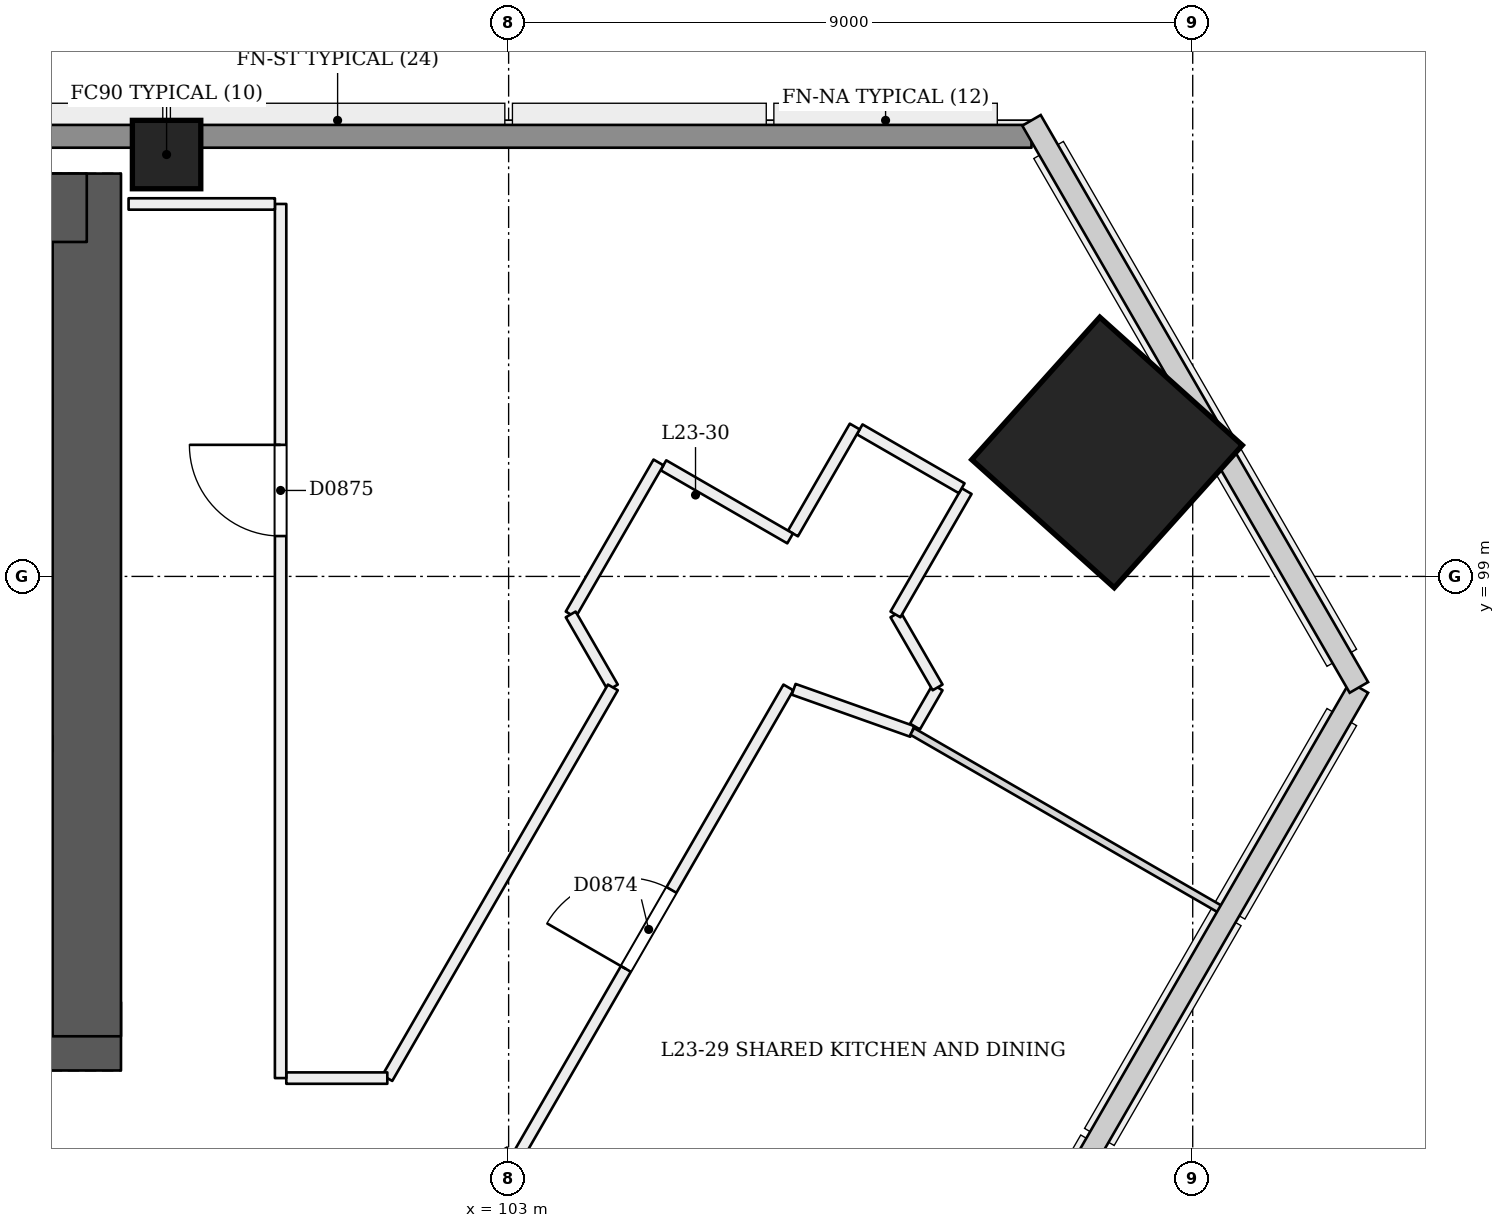
"""IFC4 building model, lengths in metres.
Left out: names, types, materials, properties, quantities, classifications, styles, units other than length and angle.
Written with IfcOpenShell. Run it as: python <this file> out.ifc"""

import sys

from ifc_helpers import new_model, si_unit, direction, frame, frame_2d, origin, origin_2d, place, context, subcontext, project, spatial, rectangle, extrude, element, fill, save


model = new_model("IFC4")
c1 = context("Model", 3, precision=1e-05, world=origin(), true_north=direction((0.0, 1.0)))
c2 = subcontext(c1, "Body", "Model", "MODEL_VIEW")
j1 = project(units=[si_unit("LENGTHUNIT", "METRE"), si_unit("PLANEANGLEUNIT", "RADIAN")], contexts=[c1])
p1 = place(None, origin())
s1 = spatial("IfcSite", under=j1, at=p1, CompositionType="ELEMENT")
p2 = place(p1, origin())
s2 = spatial("IfcBuilding", under=s1, at=p2, CompositionType="ELEMENT")
p3 = place(p2, frame((0.0, 0.0, 91.8)))
s3 = spatial("IfcBuildingStorey", under=s2, at=p3, CompositionType="ELEMENT", Elevation=91.8)
p4 = place(p3, frame((72.55, 92.95, 0.0), z_axis=(0.0, 0.0, 1.0), x_axis=(1.0, 0.0, 0.0)))
e1 = element("IfcWall", 1, at=p4, inside=s3, PredefinedType="SHEAR", context=c2, shape_type="SweptSolid", body=[
    extrude(rectangle(XDim=25.35, YDim=0.9, at=frame_2d((12.675, 0.0))), origin(), (0.0, 0.0, 1.0), 3.6),
])
p5 = place(p4, frame((1.25, 0.0, 0.0)))
e2 = element("IfcOpeningElement", 2, at=p5, cuts=e1, PredefinedType="OPENING", context=c2, shape_type="SweptSolid", body=[
    extrude(rectangle(XDim=1.2, YDim=2.1, at=frame_2d((0.6, 1.05))), frame((0.0, 0.46, 0.0), z_axis=(0.0, -1.0, 0.0), x_axis=(1.0, 0.0, 0.0)), (0.0, 0.0, 1.0), 0.921),
])
p6 = place(p4, frame((3.45, 0.0, 0.0)))
e3 = element("IfcOpeningElement", 3, at=p6, cuts=e1, PredefinedType="OPENING", context=c2, shape_type="SweptSolid", body=[
    extrude(rectangle(XDim=1.2, YDim=2.1, at=frame_2d((0.6, 1.05))), frame((0.0, 0.46, 0.0), z_axis=(0.0, -1.0, 0.0), x_axis=(1.0, 0.0, 0.0)), (0.0, 0.0, 1.0), 0.921),
])
p7 = place(p4, frame((13.45, 0.0, 0.0)))
e4 = element("IfcOpeningElement", 4, at=p7, cuts=e1, PredefinedType="OPENING", context=c2, shape_type="SweptSolid", body=[
    extrude(rectangle(XDim=1.2, YDim=2.1, at=frame_2d((0.6, 1.05))), frame((0.0, 0.46, 0.0), z_axis=(0.0, -1.0, 0.0), x_axis=(1.0, 0.0, 0.0)), (0.0, 0.0, 1.0), 0.921),
])
p8 = place(p4, frame((15.712, 0.0, 0.0)))
e5 = element("IfcOpeningElement", 5, at=p8, cuts=e1, PredefinedType="OPENING", context=c2, shape_type="SweptSolid", body=[
    extrude(rectangle(XDim=1.0, YDim=2.1, at=frame_2d((0.5, 1.05))), frame((0.0, 0.46, 0.0), z_axis=(0.0, -1.0, 0.0), x_axis=(1.0, 0.0, 0.0)), (0.0, 0.0, 1.0), 0.921),
])
p9 = place(p4, frame((18.35, 0.0, 0.0)))
e6 = element("IfcOpeningElement", 6, at=p9, cuts=e1, PredefinedType="OPENING", context=c2, shape_type="SweptSolid", body=[
    extrude(rectangle(XDim=1.0, YDim=2.1, at=frame_2d((0.5, 1.05))), frame((0.0, 0.46, 0.0), z_axis=(0.0, -1.0, 0.0), x_axis=(1.0, 0.0, 0.0)), (0.0, 0.0, 1.0), 0.921),
])
p10 = place(p4, frame((21.938, 0.0, 0.0)))
e7 = element("IfcOpeningElement", 7, at=p10, cuts=e1, PredefinedType="OPENING", context=c2, shape_type="SweptSolid", body=[
    extrude(rectangle(XDim=1.0, YDim=2.1, at=frame_2d((0.5, 1.05))), frame((0.0, 0.46, 0.0), z_axis=(0.0, -1.0, 0.0), x_axis=(1.0, 0.0, 0.0)), (0.0, 0.0, 1.0), 0.921),
])
p11 = place(p3, frame((97.45, 92.95, 0.0), z_axis=(0.0, 0.0, 1.0), x_axis=(0.0, 1.0, 0.0)))
e8 = element("IfcWall", 8, at=p11, inside=s3, PredefinedType="SHEAR", context=c2, shape_type="SweptSolid", body=[
    extrude(rectangle(XDim=11.35, YDim=0.9, at=frame_2d((5.675, 0.0))), origin(), (0.0, 0.0, 1.0), 3.6),
])
p12 = place(p3, frame((97.45, 103.85, 0.0), z_axis=(0.0, 0.0, 1.0), x_axis=(-1.0, 0.0, 0.0)))
e9 = element("IfcWall", 9, at=p12, inside=s3, PredefinedType="SHEAR", context=c2, shape_type="SweptSolid", body=[
    extrude(rectangle(XDim=25.35, YDim=0.9, at=frame_2d((12.675, 0.0))), origin(), (0.0, 0.0, 1.0), 3.6),
])
p13 = place(p3, frame((102.868, 90.934, -0.021), z_axis=(-0.022155133694, 0.038483534979, 0.999013597298), x_axis=(-0.501312238363, -0.864981546016, 0.02220280883)))
e10 = element("IfcColumn", 10, at=p13, inside=s3, PredefinedType="COLUMN", context=c2, shape_type="SweptSolid", body=[
    extrude(rectangle(XDim=0.7, YDim=0.7, at=origin_2d()), origin(), (0.0, 0.0, 1.0), 3.604),
])
p14 = place(p3, frame((110.907, 100.62, 0.0), z_axis=(-0.028403739082, 0.009219352065, 0.999554016126), x_axis=(0.500754951448, -0.865304085665, 0.022210761635)))
e11 = element("IfcColumn", 11, at=p14, inside=s3, PredefinedType="COLUMN", context=c2, shape_type="SweptSolid", body=[
    extrude(rectangle(XDim=2.52, YDim=2.52, at=origin_2d()), origin(), (0.0, 0.0, 1.0), 3.602),
])
p15 = place(p3, frame((98.5, 104.55, 0.0), z_axis=(0.0, 0.0, 1.0), x_axis=(1.0, 0.0, 0.0)))
e12 = element("IfcColumn", 12, at=p15, inside=s3, PredefinedType="COLUMN", context=c2, shape_type="SweptSolid", body=[
    extrude(rectangle(XDim=0.9, YDim=0.9, at=origin_2d()), origin(), (0.0, 0.0, 1.0), 3.6),
])
p16 = place(p3, frame((85.554, 60.948, 0.0), z_axis=(0.0, 0.0, 1.0), x_axis=(0.500001382442, 0.86602460563, 0.0)))
e13 = element("IfcWall", 13, at=p16, inside=s3, PredefinedType="PARTITIONING", context=c2, shape_type="SweptSolid", body=[
    extrude(rectangle(XDim=42.252, YDim=0.15, at=frame_2d((21.126, 0.0))), origin(), (0.0, 0.0, 1.0), 2.9),
])
p17 = place(p16, frame((0.285, 0.0, 0.0)))
e14 = element("IfcOpeningElement", 14, at=p17, cuts=e13, PredefinedType="OPENING", context=c2, shape_type="SweptSolid", body=[
    extrude(rectangle(XDim=1.2, YDim=2.1, at=frame_2d((0.6, 1.05))), frame((0.0, 0.085, 0.0), z_axis=(0.0, -1.0, 0.0), x_axis=(1.0, 0.0, 0.0)), (0.0, 0.0, 1.0), 0.171),
])
p18 = place(p16, frame((3.731, 0.0, 0.0)))
e15 = element("IfcOpeningElement", 15, at=p18, cuts=e13, PredefinedType="OPENING", context=c2, shape_type="SweptSolid", body=[
    extrude(rectangle(XDim=1.0, YDim=2.1, at=frame_2d((0.5, 1.05))), frame((0.0, 0.085, 0.0), z_axis=(0.0, -1.0, 0.0), x_axis=(1.0, 0.0, 0.0)), (0.0, 0.0, 1.0), 0.171),
])
p19 = place(p16, frame((11.526, 0.0, 0.0)))
e16 = element("IfcOpeningElement", 16, at=p19, cuts=e13, PredefinedType="OPENING", context=c2, shape_type="SweptSolid", body=[
    extrude(rectangle(XDim=1.2, YDim=2.1, at=frame_2d((0.6, 1.05))), frame((0.0, 0.085, 0.0), z_axis=(0.0, -1.0, 0.0), x_axis=(1.0, 0.0, 0.0)), (0.0, 0.0, 1.0), 0.171),
])
p20 = place(p16, frame((18.376, 0.0, 0.0)))
e17 = element("IfcOpeningElement", 17, at=p20, cuts=e13, PredefinedType="OPENING", context=c2, shape_type="SweptSolid", body=[
    extrude(rectangle(XDim=1.0, YDim=2.1, at=frame_2d((0.5, 1.05))), frame((0.0, 0.085, 0.0), z_axis=(0.0, -1.0, 0.0), x_axis=(1.0, 0.0, 0.0)), (0.0, 0.0, 1.0), 0.171),
])
p21 = place(p16, frame((21.731, 0.0, 0.0)))
e18 = element("IfcOpeningElement", 18, at=p21, cuts=e13, PredefinedType="OPENING", context=c2, shape_type="SweptSolid", body=[
    extrude(rectangle(XDim=1.0, YDim=2.1, at=frame_2d((0.5, 1.05))), frame((0.0, 0.085, 0.0), z_axis=(0.0, -1.0, 0.0), x_axis=(1.0, 0.0, 0.0)), (0.0, 0.0, 1.0), 0.171),
])
p22 = place(p16, frame((27.376, 0.0, 0.0)))
e19 = element("IfcOpeningElement", 19, at=p22, cuts=e13, PredefinedType="OPENING", context=c2, shape_type="SweptSolid", body=[
    extrude(rectangle(XDim=1.0, YDim=2.1, at=frame_2d((0.5, 1.05))), frame((0.0, 0.085, 0.0), z_axis=(0.0, -1.0, 0.0), x_axis=(1.0, 0.0, 0.0)), (0.0, 0.0, 1.0), 0.171),
])
p23 = place(p16, frame((30.697, 0.0, 0.0)))
e20 = element("IfcOpeningElement", 20, at=p23, cuts=e13, PredefinedType="OPENING", context=c2, shape_type="SweptSolid", body=[
    extrude(rectangle(XDim=1.1, YDim=2.1, at=frame_2d((0.55, 1.05))), frame((0.0, 0.085, 0.0), z_axis=(0.0, -1.0, 0.0), x_axis=(1.0, 0.0, 0.0)), (0.0, 0.0, 1.0), 0.171),
])
p24 = place(p16, frame((37.976, 0.0, 0.0)))
e21 = element("IfcOpeningElement", 21, at=p24, cuts=e13, PredefinedType="OPENING", context=c2, shape_type="SweptSolid", body=[
    extrude(rectangle(XDim=1.2, YDim=2.1, at=frame_2d((0.6, 1.05))), frame((0.0, 0.085, 0.0), z_axis=(0.0, -1.0, 0.0), x_axis=(1.0, 0.0, 0.0)), (0.0, 0.0, 1.0), 0.171),
])
p25 = place(p3, frame((106.75, 97.515, 0.0), z_axis=(0.0, 0.0, 1.0), x_axis=(0.942304690634, -0.334756433858, 0.0)))
e22 = element("IfcWall", 22, at=p25, inside=s3, PredefinedType="PARTITIONING", context=c2, shape_type="SweptSolid", body=[
    extrude(rectangle(XDim=1.655, YDim=0.15, at=frame_2d((0.827, 0.0))), origin(), (0.0, 0.0, 1.0), 3.3),
])
p26 = place(p3, frame((108.346, 97.025, 0.0), z_axis=(0.0, 0.0, 1.0), x_axis=(0.499983247966, 0.86603507536, 0.0)))
e23 = element("IfcWall", 23, at=p26, inside=s3, PredefinedType="PARTITIONING", context=c2, shape_type="SweptSolid", body=[
    extrude(rectangle(XDim=0.594, YDim=0.15, at=frame_2d((0.297, 0.0))), origin(), (0.0, 0.0, 1.0), 3.3),
])
p27 = place(p3, frame((108.644, 97.54, 0.0), z_axis=(0.0, 0.0, 1.0), x_axis=(-0.499951133605, 0.866053614973, 0.0)))
e24 = element("IfcWall", 24, at=p27, inside=s3, PredefinedType="PARTITIONING", context=c2, shape_type="SweptSolid", body=[
    extrude(rectangle(XDim=1.109, YDim=0.15, at=frame_2d((0.554, 0.0))), origin(), (0.0, 0.0, 1.0), 3.3),
])
p28 = place(p3, frame((108.089, 98.5, 0.0), z_axis=(0.0, 0.0, 1.0), x_axis=(0.499951854219, 0.86605319898, 0.0)))
e25 = element("IfcWall", 25, at=p28, inside=s3, PredefinedType="PARTITIONING", context=c2, shape_type="SweptSolid", body=[
    extrude(rectangle(XDim=1.873, YDim=0.15, at=frame_2d((0.937, 0.0))), origin(), (0.0, 0.0, 1.0), 3.3),
])
p29 = place(p3, frame((108.961, 100.16, 0.0), z_axis=(0.0, 0.0, 1.0), x_axis=(-0.865975732936, 0.500086022567, 0.0)))
e26 = element("IfcWall", 26, at=p29, inside=s3, PredefinedType="PARTITIONING", context=c2, shape_type="SweptSolid", body=[
    extrude(rectangle(XDim=1.55, YDim=0.15, at=frame_2d((0.775, 0.0))), origin(), (0.0, 0.0, 1.0), 3.3),
])
p30 = place(p3, frame((107.553, 100.972, 0.0), z_axis=(0.0, 0.0, 1.0), x_axis=(-0.500017246033, -0.866015446554, 0.0)))
e27 = element("IfcWall", 27, at=p30, inside=s3, PredefinedType="PARTITIONING", context=c2, shape_type="SweptSolid", body=[
    extrude(rectangle(XDim=1.625, YDim=0.15, at=frame_2d((0.812, 0.0))), origin(), (0.0, 0.0, 1.0), 3.3),
])
p31 = place(p3, frame((106.703, 99.5, 0.0), z_axis=(0.0, 0.0, 1.0), x_axis=(-0.866033512162, 0.499985955615, 0.0)))
e28 = element("IfcWall", 28, at=p31, inside=s3, PredefinedType="PARTITIONING", context=c2, shape_type="SweptSolid", body=[
    extrude(rectangle(XDim=1.925, YDim=0.15, at=frame_2d((0.962, 0.0))), origin(), (0.0, 0.0, 1.0), 3.3),
])
p32 = place(p3, frame((104.971, 100.5, 0.0), z_axis=(0.0, 0.0, 1.0), x_axis=(-0.500027479704, -0.866009537788, 0.0)))
e29 = element("IfcWall", 29, at=p32, inside=s3, PredefinedType="PARTITIONING", context=c2, shape_type="SweptSolid", body=[
    extrude(rectangle(XDim=2.309, YDim=0.15, at=frame_2d((1.155, 0.0))), origin(), (0.0, 0.0, 1.0), 3.3),
])
p33 = place(p3, frame((103.817, 98.5, 0.0), z_axis=(0.0, 0.0, 1.0), x_axis=(0.50011622646, -0.865958290007, 0.0)))
e30 = element("IfcWall", 30, at=p33, inside=s3, PredefinedType="PARTITIONING", context=c2, shape_type="SweptSolid", body=[
    extrude(rectangle(XDim=1.109, YDim=0.15, at=frame_2d((0.555, 0.0))), origin(), (0.0, 0.0, 1.0), 3.3),
])
p34 = place(p3, frame((104.371, 97.54, 0.0), z_axis=(0.0, 0.0, 1.0), x_axis=(-0.500019194352, -0.866014321637, 0.0)))
e31 = element("IfcWall", 31, at=p34, inside=s3, PredefinedType="PARTITIONING", context=c2, shape_type="SweptSolid", body=[
    extrude(rectangle(XDim=5.935, YDim=0.15, at=frame_2d((2.967, 0.0))), origin(), (0.0, 0.0, 1.0), 3.3),
])
p35 = place(p3, frame((101.404, 92.4, 0.0), z_axis=(0.0, 0.0, 1.0), x_axis=(-1.0, 0.0, 0.0)))
e32 = element("IfcWall", 32, at=p35, inside=s3, PredefinedType="PARTITIONING", context=c2, shape_type="SweptSolid", body=[
    extrude(rectangle(XDim=1.329, YDim=0.15, at=frame_2d((0.665, 0.0))), origin(), (0.0, 0.0, 1.0), 3.3),
])
p36 = place(p3, frame((100.0, 92.4, 0.0), z_axis=(0.0, 0.0, 1.0), x_axis=(0.0, 1.0, 0.0)))
e33 = element("IfcWall", 33, at=p36, inside=s3, PredefinedType="PARTITIONING", context=c2, shape_type="SweptSolid", body=[
    extrude(rectangle(XDim=11.5, YDim=0.15, at=frame_2d((5.75, 0.0))), origin(), (0.0, 0.0, 1.0), 3.3),
])
p37 = place(p36, frame((7.131, 0.0, 0.0)))
e34 = element("IfcOpeningElement", 34, at=p37, cuts=e33, PredefinedType="OPENING", context=c2, shape_type="SweptSolid", body=[
    extrude(rectangle(XDim=1.2, YDim=2.1, at=frame_2d((0.6, 1.05))), frame((0.0, 0.085, 0.0), z_axis=(0.0, -1.0, 0.0), x_axis=(1.0, 0.0, 0.0)), (0.0, 0.0, 1.0), 0.171),
])
p38 = place(p3, frame((99.925, 103.9, 0.0), z_axis=(0.0, 0.0, 1.0), x_axis=(-1.0, 0.0, 0.0)))
e35 = element("IfcWall", 35, at=p38, inside=s3, PredefinedType="PARTITIONING", context=c2, shape_type="SweptSolid", body=[
    extrude(rectangle(XDim=1.925, YDim=0.15, at=frame_2d((0.962, 0.0))), origin(), (0.0, 0.0, 1.0), 3.3),
])
p39 = place(p3, frame((112.397, 94.601, 0.0), z_axis=(0.0, 0.0, 1.0), x_axis=(-0.866028828302, 0.499994068514, 0.0)))
e36 = element("IfcWall", 36, at=p39, inside=s3, PredefinedType="PARTITIONING", context=c2, shape_type="SweptSolid", body=[
    extrude(rectangle(XDim=4.72, YDim=0.1, at=frame_2d((2.36, 0.0))), origin(), (0.0, 0.0, 1.0), 3.3),
])
p40 = place(p3, frame((60.121, 104.79, 0.0), z_axis=(0.0, 0.0, 1.0), x_axis=(1.0, 0.0, 0.0)))
e37 = element("IfcWall", 37, at=p40, inside=s3, PredefinedType="SOLIDWALL", context=c2, shape_type="SweptSolid", body=[
    extrude(rectangle(XDim=49.758, YDim=0.3, at=frame_2d((24.879, 0.0))), origin(), (0.0, 0.0, 1.0), 3.3),
])
p41 = place(p24, origin())
e38 = element("IfcDoor", 38, at=p41, inside=s3, OperationType="SINGLE_SWING_LEFT", PredefinedType="NOTDEFINED", context=c2, shape_type="SweptSolid", body=[
    extrude(rectangle(XDim=1.2, YDim=2.1, at=frame_2d((0.6, 1.05))), frame((0.0, 0.025, 0.0), z_axis=(0.0, -1.0, 0.0), x_axis=(1.0, 0.0, 0.0)), (0.0, 0.0, 1.0), 0.05),
])
fill(e21, e38)
p42 = place(p37, origin())
e39 = element("IfcDoor", 39, at=p42, inside=s3, OperationType="SINGLE_SWING_RIGHT", PredefinedType="NOTDEFINED", context=c2, shape_type="SweptSolid", body=[
    extrude(rectangle(XDim=1.2, YDim=2.1, at=frame_2d((0.6, 1.05))), frame((0.0, 0.025, 0.0), z_axis=(0.0, -1.0, 0.0), x_axis=(1.0, 0.0, 0.0)), (0.0, 0.0, 1.0), 0.05),
])
fill(e34, e39)
save(model, sys.argv[1])
